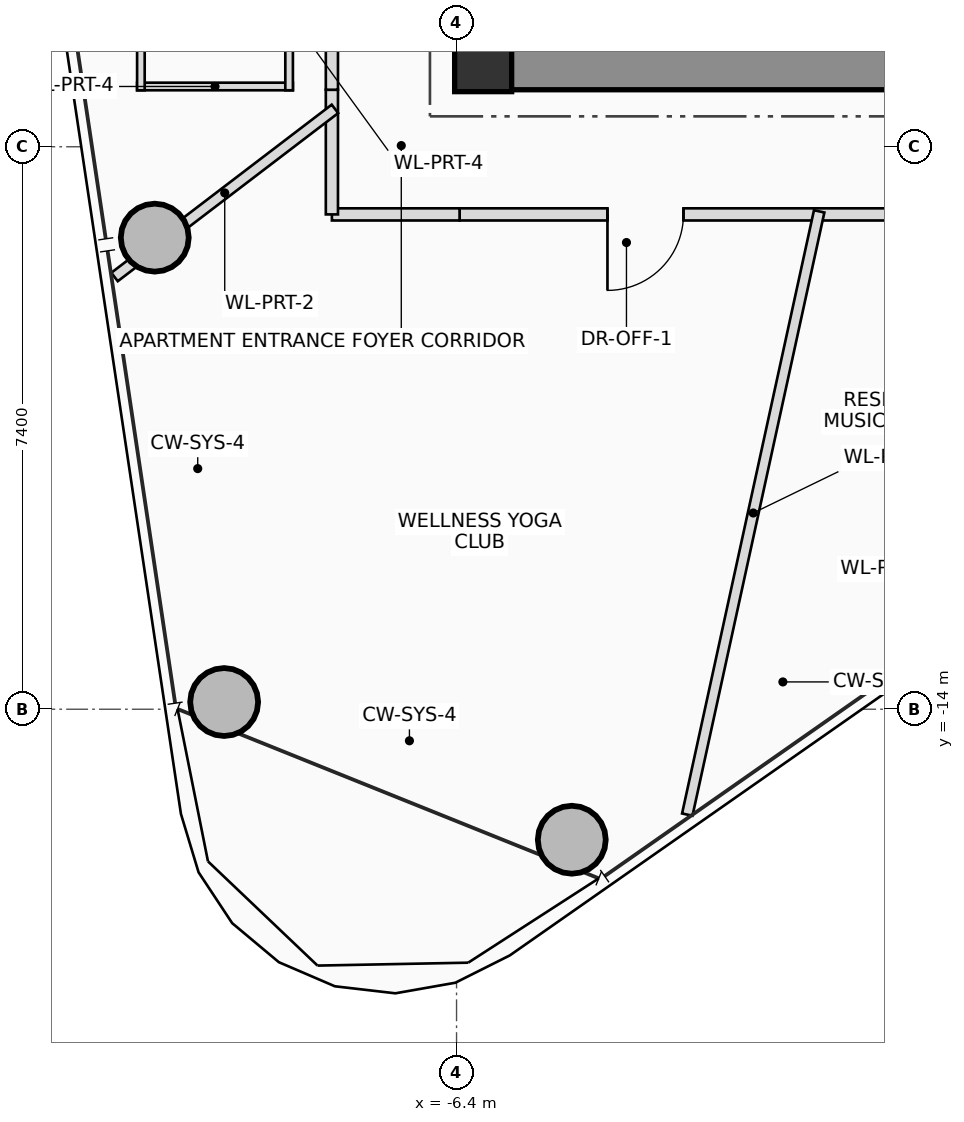
"""IFC4 building model, lengths in metres.
Left out: names, types, materials, properties, quantities, classifications, styles, units other than length and angle.
Written with IfcOpenShell. Run it as: python <this file> out.ifc"""

import sys

from ifc_helpers import new_model, si_unit, direction, frame, frame_2d, origin, origin_2d, place, context, subcontext, project, spatial, rectangle, hollow_circle, extrude, source, transform, mapped, element, fill, save


model = new_model("IFC4")
c1 = context("Model", 3, precision=1e-05, world=origin(), true_north=direction((0.0, 1.0)))
c2 = subcontext(c1, "Body", "Model", "MODEL_VIEW")
j1 = project(units=[si_unit("LENGTHUNIT", "METRE"), si_unit("PLANEANGLEUNIT", "RADIAN")], contexts=[c1])
p1 = place(None, origin())
s1 = spatial("IfcSite", under=j1, at=p1, CompositionType="ELEMENT")
p2 = place(p1, origin())
s2 = spatial("IfcBuilding", under=s1, at=p2, CompositionType="ELEMENT")
p3 = place(p2, frame((0.0, 0.0, 260.95)))
s3 = spatial("IfcBuildingStorey", under=s2, at=p3, CompositionType="ELEMENT", Elevation=260.95)
m1 = source(origin(), c2, "Body", "SweptSolid", [
    extrude(rectangle(XDim=0.75, YDim=0.75, at=origin_2d()), origin(), (0.0, 0.0, 1.0), 3.4),
])
p4 = place(p3, frame((-6.05, -5.5, 0.0), z_axis=(0.0, 0.0, 1.0), x_axis=(1.0, 0.0, 0.0)))
e1 = element("IfcColumn", 1, at=p4, inside=s3, PredefinedType="COLUMN", context=c2, shape_type="MappedRepresentation", body=[
    mapped(m1, transform((0.0, 0.0, 0.0), scale=1.0)),
])
p5 = place(p3, frame((-6.4, -5.575, 0.0), z_axis=(0.0, 0.0, 1.0), x_axis=(1.0, 0.0, 0.0)))
e2 = element("IfcWall", 2, at=p5, inside=s3, PredefinedType="SHEAR", context=c2, shape_type="SweptSolid", body=[
    extrude(rectangle(XDim=12.8, YDim=0.55, at=frame_2d((6.4, 0.0))), origin(), (0.0, 0.0, 1.0), 3.4),
])
p6 = place(p5, frame((8.6, 0.0, 0.0)))
e3 = element("IfcOpeningElement", 3, at=p6, cuts=e2, PredefinedType="OPENING", context=c2, shape_type="SweptSolid", body=[
    extrude(rectangle(XDim=1.2, YDim=2.2, at=frame_2d((0.6, 1.1))), frame((0.0, 0.285, 0.0), z_axis=(0.0, -1.0, 0.0), x_axis=(1.0, 0.0, 0.0)), (0.0, 0.0, 1.0), 0.57),
])
m2 = source(origin(), c2, "Body", "SweptSolid", [
    extrude(hollow_circle(Radius=0.45, WallThickness=0.032, at=origin_2d()), origin(), (0.0, 0.0, 1.0), 3.4),
])
for number, where, z_axis, x_axis in (
    (4, (-4.884, -15.717, 0.0), (0.0, 0.0, 1.0), (1.0, 0.0, 0.0)),
    (5, (-10.371, -7.796, 0.0), (0.0, 0.0, 1.0), (1.0, 0.0, 0.0)),
    (6, (-9.458, -13.905, 0.0), (0.0, 0.0, 1.0), (1.0, 0.0, 0.0)),
):
    element("IfcColumn", number, at=place(p3, frame(where, z_axis=z_axis, x_axis=x_axis)), inside=s3, PredefinedType="COLUMN", context=c2, shape_type="MappedRepresentation", body=[
        mapped(m2, transform((0.0, 0.0, 0.0), scale=1.0)),
    ])
p7 = place(p3, frame((-8.553, -5.807, 0.0), z_axis=(0.0, 0.0, 1.0), x_axis=(-1.0, 0.0, 0.0)))
e7 = element("IfcWall", 7, at=p7, inside=s3, PredefinedType="PARTITIONING", context=c2, shape_type="SweptSolid", body=[
    extrude(rectangle(XDim=2.05, YDim=0.1, at=frame_2d((1.025, 0.0))), origin(), (0.0, 0.0, 1.0), 2.765),
])
p8 = place(p3, frame((-8.603, -3.857, 0.0), z_axis=(0.0, 0.0, 1.0), x_axis=(0.0, -1.0, 0.0)))
e8 = element("IfcWall", 8, at=p8, inside=s3, PredefinedType="PARTITIONING", context=c2, shape_type="SweptSolid", body=[
    extrude(rectangle(XDim=2.0, YDim=0.1, at=frame_2d((1.0, 0.0))), origin(), (0.0, 0.0, 1.0), 2.805),
])
p9 = place(p3, frame((-10.553, -5.857, 0.0), z_axis=(0.0, 0.0, 1.0), x_axis=(0.0, 1.0, 0.0)))
e9 = element("IfcWall", 9, at=p9, inside=s3, PredefinedType="PARTITIONING", context=c2, shape_type="SweptSolid", body=[
    extrude(rectangle(XDim=2.0, YDim=0.1, at=frame_2d((1.0, 0.0))), origin(), (0.0, 0.0, 1.0), 2.765),
])
p10 = place(p3, frame((3.45, -7.49, 0.0), z_axis=(0.0, 0.0, 1.0), x_axis=(-1.0, 0.0, 0.0)))
e10 = element("IfcWall", 10, at=p10, inside=s3, PredefinedType="PARTITIONING", context=c2, shape_type="SweptSolid", body=[
    extrude(rectangle(XDim=9.81, YDim=0.16, at=frame_2d((4.905, 0.0))), origin(), (0.0, 0.0, 1.0), 2.605),
])
p11 = place(p10, frame((2.973, 0.0, 0.0)))
e11 = element("IfcOpeningElement", 11, at=p11, cuts=e10, PredefinedType="OPENING", context=c2, shape_type="SweptSolid", body=[
    extrude(rectangle(XDim=1.0, YDim=2.25, at=frame_2d((0.5, 1.125))), frame((0.0, 0.09, 0.0), z_axis=(0.0, -1.0, 0.0), x_axis=(1.0, 0.0, 0.0)), (0.0, 0.0, 1.0), 0.18),
])
p12 = place(p10, frame((6.865, 0.0, 0.0)))
e12 = element("IfcOpeningElement", 12, at=p12, cuts=e10, PredefinedType="OPENING", context=c2, shape_type="SweptSolid", body=[
    extrude(rectangle(XDim=1.0, YDim=2.25, at=frame_2d((0.5, 1.125))), frame((0.0, 0.09, 0.0), z_axis=(0.0, -1.0, 0.0), x_axis=(1.0, 0.0, 0.0)), (0.0, 0.0, 1.0), 0.18),
])
p13 = place(p3, frame((-6.36, -7.49, 0.0), z_axis=(0.0, 0.0, 1.0), x_axis=(-1.0, 0.0, 0.0)))
e13 = element("IfcWall", 13, at=p13, inside=s3, PredefinedType="PARTITIONING", context=c2, shape_type="SweptSolid", body=[
    extrude(rectangle(XDim=1.68, YDim=0.16, at=frame_2d((0.84, 0.0))), origin(), (0.0, 0.0, 1.0), 2.605),
])
p14 = place(p3, frame((-8.04, -7.49, 0.0), z_axis=(0.0, 0.0, 1.0), x_axis=(0.0, 1.0, 0.0)))
e14 = element("IfcWall", 14, at=p14, inside=s3, PredefinedType="PARTITIONING", context=c2, shape_type="SweptSolid", body=[
    extrude(rectangle(XDim=1.64, YDim=0.16, at=frame_2d((0.82, 0.0))), origin(), (0.0, 0.0, 1.0), 2.605),
])
p15 = place(p3, frame((-8.04, -5.85, 0.0), z_axis=(0.0, 0.0, 1.0), x_axis=(0.0, 1.0, 0.0)))
e15 = element("IfcWall", 15, at=p15, inside=s3, PredefinedType="PARTITIONING", context=c2, shape_type="SweptSolid", body=[
    extrude(rectangle(XDim=11.7, YDim=0.16, at=frame_2d((5.85, 0.0))), origin(), (0.0, 0.0, 1.0), 2.605),
])
p16 = place(p15, frame((2.661, 0.0, 0.0)))
e16 = element("IfcOpeningElement", 16, at=p16, cuts=e15, PredefinedType="OPENING", context=c2, shape_type="SweptSolid", body=[
    extrude(rectangle(XDim=1.0, YDim=2.25, at=frame_2d((0.5, 1.125))), frame((0.0, 0.09, 0.0), z_axis=(0.0, -1.0, 0.0), x_axis=(1.0, 0.0, 0.0)), (0.0, 0.0, 1.0), 0.18),
])
p17 = place(p15, frame((7.771, 0.0, 0.0)))
e17 = element("IfcOpeningElement", 17, at=p17, cuts=e15, PredefinedType="OPENING", context=c2, shape_type="SweptSolid", body=[
    extrude(rectangle(XDim=1.0, YDim=2.25, at=frame_2d((0.5, 1.125))), frame((0.0, 0.09, 0.0), z_axis=(0.0, -1.0, 0.0), x_axis=(1.0, 0.0, 0.0)), (0.0, 0.0, 1.0), 0.18),
])
p18 = place(p3, frame((-8.0, -6.102, 0.0), z_axis=(0.0, 0.0, 1.0), x_axis=(-0.795138118829, -0.606428373335, 0.0)))
e18 = element("IfcWall", 18, at=p18, inside=s3, PredefinedType="PARTITIONING", context=c2, shape_type="SweptSolid", body=[
    extrude(rectangle(XDim=3.647, YDim=0.14, at=frame_2d((1.823, 0.0))), origin(), (0.0, 0.0, 1.0), 2.605),
])
p19 = place(p3, frame((-1.629, -7.45, 0.0), z_axis=(0.0, 0.0, 1.0), x_axis=(-0.213607255038, -0.976919618287, 0.0)))
e19 = element("IfcWall", 19, at=p19, inside=s3, PredefinedType="PARTITIONING", context=c2, shape_type="SweptSolid", body=[
    extrude(rectangle(XDim=8.124, YDim=0.14, at=frame_2d((4.062, 0.0))), origin(), (0.0, 0.0, 1.0), 2.765),
])
p20 = place(p12, origin())
e20 = element("IfcDoor", 20, at=p20, inside=s3, OperationType="SINGLE_SWING_RIGHT", PredefinedType="DOOR", context=c2, shape_type="SweptSolid", body=[
    extrude(rectangle(XDim=1.0, YDim=2.25, at=frame_2d((0.5, 1.125))), frame((0.0, 0.025, 0.0), z_axis=(0.0, -1.0, 0.0), x_axis=(1.0, 0.0, 0.0)), (0.0, 0.0, 1.0), 0.05),
])
fill(e12, e20)
save(model, sys.argv[1])
